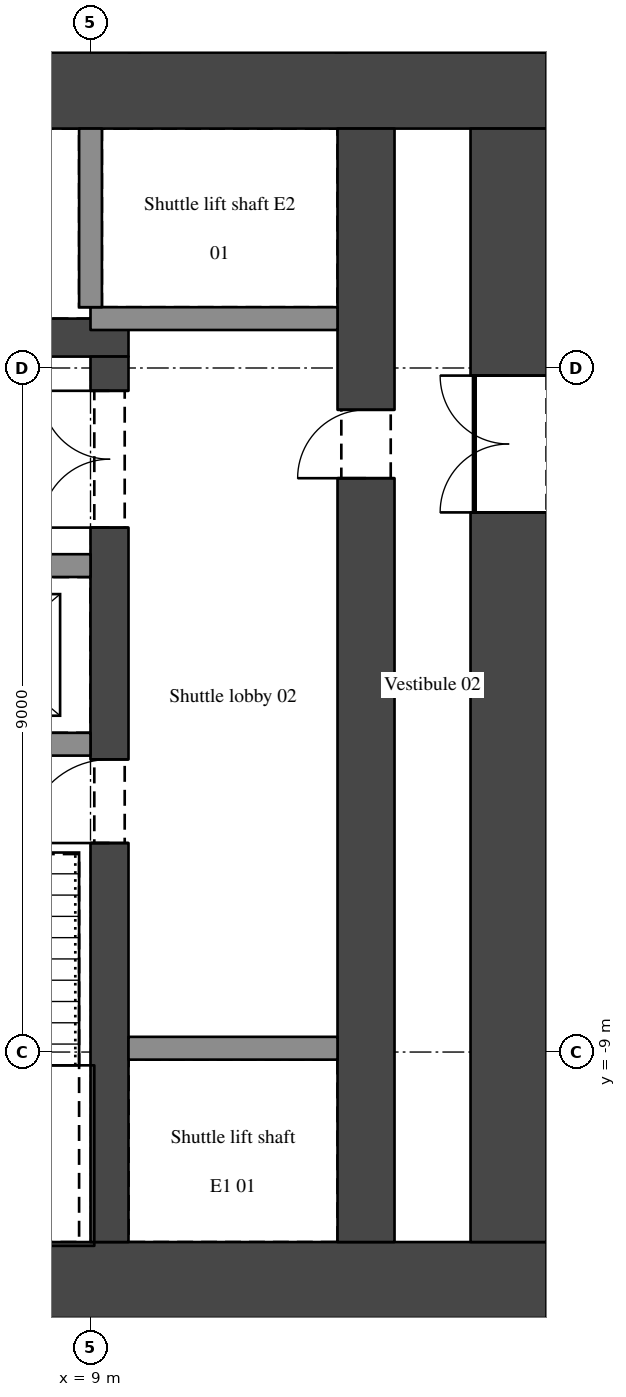
"""IFC4 building model, lengths in metres.
Left out: names, types, materials, properties, quantities, classifications, styles, units other than length and angle.
Written with IfcOpenShell. Run it as: python <this file> out.ifc"""

import sys

from ifc_helpers import new_model, si_unit, direction, frame, frame_2d, origin, place, context, subcontext, project, spatial, rectangle, extrude, element, fill, save


model = new_model("IFC4")
c1 = context("Model", 3, precision=1e-05, world=origin(), true_north=direction((0.0, 1.0)))
c2 = subcontext(c1, "Body", "Model", "MODEL_VIEW")
j1 = project(units=[si_unit("LENGTHUNIT", "METRE"), si_unit("PLANEANGLEUNIT", "RADIAN")], contexts=[c1])
p1 = place(None, origin())
s1 = spatial("IfcSite", under=j1, at=p1, CompositionType="ELEMENT")
p2 = place(p1, origin())
s2 = spatial("IfcBuilding", under=s1, at=p2, CompositionType="ELEMENT")
p3 = place(p2, frame((0.0, 0.0, 105.0)))
s3 = spatial("IfcBuildingStorey", under=s2, at=p3, CompositionType="ELEMENT", Elevation=105.0)
for number, where, z_axis, x_axis in (
    (1, (-15.0, -12.0, 0.0), (0.0, 0.0, 1.0), (1.0, 0.0, 0.0)),
    (2, (-15.0, 3.65, 0.0), (0.0, 0.0, 1.0), (1.0, 0.0, 0.0)),
):
    element("IfcWall", number, at=place(p3, frame(where, z_axis=z_axis, x_axis=x_axis)), inside=s3, PredefinedType="SHEAR", context=c2, shape_type="SweptSolid", body=[
        extrude(rectangle(XDim=30.0, YDim=1.0, at=frame_2d((15.0, 0.0))), origin(), (0.0, 0.0, 1.0), 3.9),
    ])
p4 = place(p3, frame((14.5, -11.5, 0.0), z_axis=(0.0, 0.0, 1.0), x_axis=(0.0, 1.0, 0.0)))
e3 = element("IfcWall", 3, at=p4, inside=s3, PredefinedType="SHEAR", context=c2, shape_type="SweptSolid", body=[
    extrude(rectangle(XDim=14.65, YDim=1.0, at=frame_2d((7.325, 0.0))), origin(), (0.0, 0.0, 1.0), 3.9),
])
p5 = place(p4, frame((9.6, 0.0, 0.0)))
e4 = element("IfcOpeningElement", 4, at=p5, cuts=e3, PredefinedType="OPENING", context=c2, shape_type="SweptSolid", body=[
    extrude(rectangle(XDim=1.8, YDim=2.1, at=frame_2d((0.9, 1.05))), frame((0.0, 0.51, 0.0), z_axis=(0.0, -1.0, 0.0), x_axis=(1.0, 0.0, 0.0)), (0.0, 0.0, 1.0), 1.02),
])
p6 = place(p3, frame((12.625, -11.5, 0.0), z_axis=(0.0, 0.0, 1.0), x_axis=(0.0, 1.0, 0.0)))
e5 = element("IfcWall", 5, at=p6, inside=s3, PredefinedType="SHEAR", context=c2, shape_type="SweptSolid", body=[
    extrude(rectangle(XDim=14.65, YDim=0.75, at=frame_2d((7.325, 0.0))), origin(), (0.0, 0.0, 1.0), 3.9),
])
p7 = place(p6, frame((10.05, 0.0, 0.0)))
e6 = element("IfcOpeningElement", 6, at=p7, cuts=e5, PredefinedType="OPENING", context=c2, shape_type="SweptSolid", body=[
    extrude(rectangle(XDim=0.9, YDim=2.1, at=frame_2d((0.45, 1.05))), frame((0.0, 0.385, 0.0), z_axis=(0.0, -1.0, 0.0), x_axis=(1.0, 0.0, 0.0)), (0.0, 0.0, 1.0), 0.77),
])
p8 = place(p3, frame((-9.5, 0.4, 0.0), z_axis=(0.0, 0.0, 1.0), x_axis=(1.0, 0.0, 0.0)))
e7 = element("IfcWall", 7, at=p8, inside=s3, PredefinedType="SHEAR", context=c2, shape_type="SweptSolid", body=[
    extrude(rectangle(XDim=19.0, YDim=0.5, at=frame_2d((9.5, 0.0))), origin(), (0.0, 0.0, 1.0), 3.9),
])
p9 = place(p3, frame((9.25, -11.5, 0.0), z_axis=(0.0, 0.0, 1.0), x_axis=(0.0, 1.0, 0.0)))
e8 = element("IfcWall", 8, at=p9, inside=s3, PredefinedType="SHEAR", context=c2, shape_type="SweptSolid", body=[
    extrude(rectangle(XDim=11.65, YDim=0.5, at=frame_2d((5.825, 0.0))), origin(), (0.0, 0.0, 1.0), 3.9),
])
p10 = place(p9, frame((9.4, 0.0, 0.0)))
e9 = element("IfcOpeningElement", 9, at=p10, cuts=e8, PredefinedType="OPENING", context=c2, shape_type="SweptSolid", body=[
    extrude(rectangle(XDim=1.8, YDim=2.1, at=frame_2d((0.9, 1.05))), frame((0.0, 0.26, 0.0), z_axis=(0.0, -1.0, 0.0), x_axis=(1.0, 0.0, 0.0)), (0.0, 0.0, 1.0), 0.52),
])
p11 = place(p9, frame((5.25, 0.0, 0.0)))
e10 = element("IfcOpeningElement", 10, at=p11, cuts=e8, PredefinedType="OPENING", context=c2, shape_type="SweptSolid", body=[
    extrude(rectangle(XDim=1.1, YDim=2.1, at=frame_2d((0.55, 1.05))), frame((0.0, 0.26, 0.0), z_axis=(0.0, -1.0, 0.0), x_axis=(1.0, 0.0, 0.0)), (0.0, 0.0, 1.0), 0.52),
])
p12 = place(p3, frame((9.5, -8.95, 0.0), z_axis=(0.0, 0.0, 1.0), x_axis=(1.0, 0.0, 0.0)))
e11 = element("IfcWall", 11, at=p12, inside=s3, PredefinedType="SHEAR", context=c2, shape_type="SweptSolid", body=[
    extrude(rectangle(XDim=2.75, YDim=0.3, at=frame_2d((1.375, 0.0))), origin(), (0.0, 0.0, 1.0), 3.9),
])
p13 = place(p3, frame((0.9, -4.95, 0.0), z_axis=(0.0, 0.0, 1.0), x_axis=(1.0, 0.0, 0.0)))
e12 = element("IfcWall", 12, at=p13, inside=s3, PredefinedType="SHEAR", context=c2, shape_type="SweptSolid", body=[
    extrude(rectangle(XDim=8.1, YDim=0.3, at=frame_2d((4.05, 0.0))), origin(), (0.0, 0.0, 1.0), 3.9),
])
p14 = place(p3, frame((0.9, -2.6, 0.0), z_axis=(0.0, 0.0, 1.0), x_axis=(1.0, 0.0, 0.0)))
e13 = element("IfcWall", 13, at=p14, inside=s3, PredefinedType="SHEAR", context=c2, shape_type="SweptSolid", body=[
    extrude(rectangle(XDim=8.1, YDim=0.3, at=frame_2d((4.05, 0.0))), origin(), (0.0, 0.0, 1.0), 3.9),
])
p15 = place(p14, frame((0.8, 0.0, 0.0)))
e14 = element("IfcOpeningElement", 14, at=p15, cuts=e13, PredefinedType="OPENING", context=c2, shape_type="SweptSolid", body=[
    extrude(rectangle(XDim=1.1, YDim=2.1, at=frame_2d((0.55, 1.05))), frame((0.0, 0.16, 0.0), z_axis=(0.0, -1.0, 0.0), x_axis=(1.0, 0.0, 0.0)), (0.0, 0.0, 1.0), 0.32),
])
p16 = place(p14, frame((3.5, 0.0, 0.0)))
e15 = element("IfcOpeningElement", 15, at=p16, cuts=e13, PredefinedType="OPENING", context=c2, shape_type="SweptSolid", body=[
    extrude(rectangle(XDim=1.1, YDim=2.1, at=frame_2d((0.55, 1.05))), frame((0.0, 0.16, 0.0), z_axis=(0.0, -1.0, 0.0), x_axis=(1.0, 0.0, 0.0)), (0.0, 0.0, 1.0), 0.32),
])
p17 = place(p14, frame((6.2, 0.0, 0.0)))
e16 = element("IfcOpeningElement", 16, at=p17, cuts=e13, PredefinedType="OPENING", context=c2, shape_type="SweptSolid", body=[
    extrude(rectangle(XDim=1.1, YDim=2.1, at=frame_2d((0.55, 1.05))), frame((0.0, 0.16, 0.0), z_axis=(0.0, -1.0, 0.0), x_axis=(1.0, 0.0, 0.0)), (0.0, 0.0, 1.0), 0.32),
])
p18 = place(p3, frame((12.25, 0.65, 0.0), z_axis=(0.0, 0.0, 1.0), x_axis=(-1.0, 0.0, 0.0)))
e17 = element("IfcWall", 17, at=p18, inside=s3, PredefinedType="SHEAR", context=c2, shape_type="SweptSolid", body=[
    extrude(rectangle(XDim=3.25, YDim=0.3, at=frame_2d((1.625, 0.0))), origin(), (0.0, 0.0, 1.0), 3.9),
])
p19 = place(p3, frame((9.0, 0.8, 0.0), z_axis=(0.0, 0.0, 1.0), x_axis=(0.0, 1.0, 0.0)))
e18 = element("IfcWall", 18, at=p19, inside=s3, PredefinedType="SHEAR", context=c2, shape_type="SweptSolid", body=[
    extrude(rectangle(XDim=2.35, YDim=0.3, at=frame_2d((1.175, 0.0))), origin(), (0.0, 0.0, 1.0), 3.9),
])
for number, where, z_axis, x_axis in (
    (19, (9.575, 4.15, 0.0), (0.0, 0.0, 1.0), (0.0, 1.0, 0.0)),
    (20, (12.3, 4.15, 0.0), (0.0, 0.0, 1.0), (0.0, 1.0, 0.0)),
):
    element("IfcWall", number, at=place(p3, frame(where, z_axis=z_axis, x_axis=x_axis)), inside=s3, PredefinedType="PARTITIONING", context=c2, shape_type="SweptSolid", body=[
        extrude(rectangle(XDim=5.38, YDim=0.15, at=frame_2d((2.69, 0.0))), origin(), (0.0, 0.0, 1.0), 2.96),
    ])
p20 = place(p3, frame((15.0, 4.15, 0.0), z_axis=(0.0, 0.0, 1.0), x_axis=(0.0, 1.0, 0.0)))
e21 = element("IfcWall", 21, at=p20, inside=s3, PredefinedType="PARTITIONING", context=c2, shape_type="SweptSolid", body=[
    extrude(rectangle(XDim=5.38, YDim=0.15, at=frame_2d((2.69, 0.0))), origin(), (0.0, 0.0, 1.0), 2.96),
])
p21 = place(p20, frame((0.914, 0.0, 0.0)))
e22 = element("IfcOpeningElement", 22, at=p21, cuts=e21, PredefinedType="OPENING", context=c2, shape_type="SweptSolid", body=[
    extrude(rectangle(XDim=0.9, YDim=2.1, at=frame_2d((0.45, 1.05))), frame((0.0, 0.085, 0.0), z_axis=(0.0, -1.0, 0.0), x_axis=(1.0, 0.0, 0.0)), (0.0, 0.0, 1.0), 0.17),
])
p22 = place(p5, origin())
e23 = element("IfcDoor", 23, at=p22, inside=s3, OperationType="DOUBLE_DOOR_SINGLE_SWING", PredefinedType="DOOR", context=c2, shape_type="SweptSolid", body=[
    extrude(rectangle(XDim=1.8, YDim=2.1, at=frame_2d((0.9, 1.05))), frame((0.0, 0.025, 0.0), z_axis=(0.0, -1.0, 0.0), x_axis=(1.0, 0.0, 0.0)), (0.0, 0.0, 1.0), 0.05),
])
fill(e4, e23)
p23 = place(p10, origin())
e24 = element("IfcDoor", 24, at=p23, inside=s3, OperationType="DOUBLE_DOOR_SINGLE_SWING", PredefinedType="DOOR", context=c2, shape_type="SweptSolid", body=[
    extrude(rectangle(XDim=1.8, YDim=2.1, at=frame_2d((0.9, 1.05))), frame((0.0, 0.025, 0.0), z_axis=(0.0, -1.0, 0.0), x_axis=(1.0, 0.0, 0.0)), (0.0, 0.0, 1.0), 0.05),
])
fill(e9, e24)
p24 = place(p11, origin())
e25 = element("IfcDoor", 25, at=p24, inside=s3, OperationType="SINGLE_SWING_LEFT", PredefinedType="DOOR", context=c2, shape_type="SweptSolid", body=[
    extrude(rectangle(XDim=1.1, YDim=2.1, at=frame_2d((0.55, 1.05))), frame((0.0, 0.025, 0.0), z_axis=(0.0, -1.0, 0.0), x_axis=(1.0, 0.0, 0.0)), (0.0, 0.0, 1.0), 0.05),
])
fill(e10, e25)
p25 = place(p7, origin())
e26 = element("IfcDoor", 26, at=p25, inside=s3, OperationType="SINGLE_SWING_LEFT", PredefinedType="DOOR", context=c2, shape_type="SweptSolid", body=[
    extrude(rectangle(XDim=0.9, YDim=2.1, at=frame_2d((0.45, 1.05))), frame((0.0, 0.025, 0.0), z_axis=(0.0, -1.0, 0.0), x_axis=(1.0, 0.0, 0.0)), (0.0, 0.0, 1.0), 0.05),
])
fill(e6, e26)
save(model, sys.argv[1])
